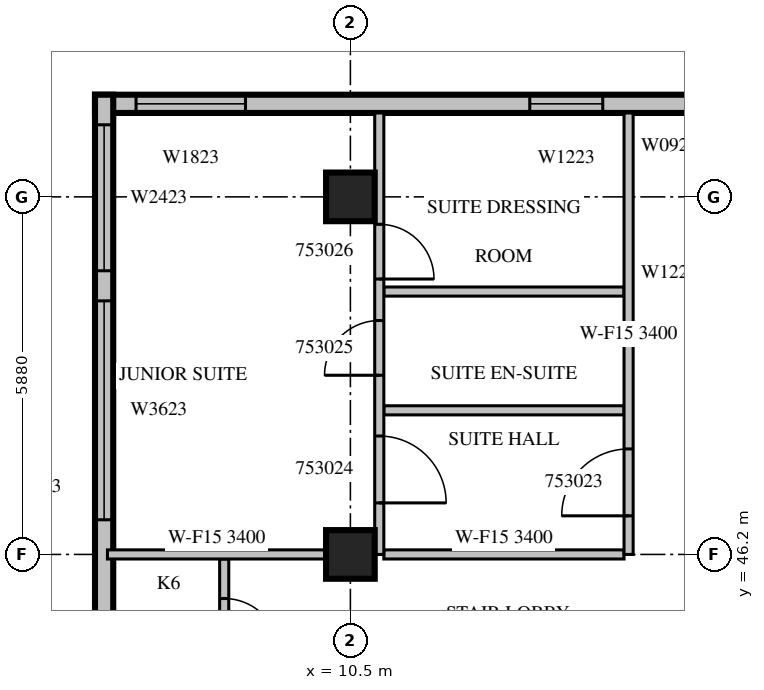
"""IFC4 building model, lengths in metres.
Left out: names, types, materials, properties, quantities, classifications, styles, units other than length and angle.
Written with IfcOpenShell. Run it as: python <this file> out.ifc"""

import sys

from ifc_helpers import new_model, si_unit, direction, frame, frame_2d, origin, origin_2d, place, context, subcontext, project, spatial, rectangle, extrude, source, transform, mapped, element, fill, save


model = new_model("IFC4")
c1 = context("Model", 3, precision=1e-05, world=origin(), true_north=direction((0.0, 1.0)))
c2 = subcontext(c1, "Body", "Model", "MODEL_VIEW")
j1 = project(units=[si_unit("LENGTHUNIT", "METRE"), si_unit("PLANEANGLEUNIT", "RADIAN")], contexts=[c1])
p1 = place(None, origin())
s1 = spatial("IfcSite", under=j1, at=p1, CompositionType="ELEMENT")
p2 = place(p1, origin())
s2 = spatial("IfcBuilding", under=s1, at=p2, CompositionType="ELEMENT")
p3 = place(p2, frame((0.0, 0.0, 234.8)))
s3 = spatial("IfcBuildingStorey", under=s2, at=p3, CompositionType="ELEMENT", Elevation=234.8)
m1 = source(origin(), c2, "Body", "SweptSolid", [
    extrude(rectangle(XDim=0.8, YDim=0.8, at=origin_2d()), origin(), (0.0, 0.0, 1.0), 3.8),
])
for number, where, z_axis, x_axis in (
    (1, (10.5, 46.2, 0.0), (0.0, 0.0, 1.0), (1.0, 0.0, 0.0)),
    (2, (10.5, 52.08, 0.0), (0.0, 0.0, 1.0), (1.0, 0.0, 0.0)),
):
    element("IfcColumn", number, at=place(p3, frame(where, z_axis=z_axis, x_axis=x_axis)), inside=s3, PredefinedType="COLUMN", context=c2, shape_type="MappedRepresentation", body=[
        mapped(m1, transform((0.0, 0.0, 0.0), scale=1.0)),
    ])
m2 = source(origin(), c2, "Body", "SweptSolid", [
    extrude(rectangle(XDim=10.5, YDim=0.3, at=frame_2d((5.25, 0.0))), origin(), (0.0, 0.0, 1.0), 3.4),
])
p4 = place(p3, frame((16.8, 53.61, 0.0), z_axis=(0.0, 0.0, 1.0), x_axis=(-1.0, 0.0, 0.0)))
e3 = element("IfcWall", 3, at=p4, inside=s3, PredefinedType="STANDARD", context=c2, shape_type="MappedRepresentation", body=[
    mapped(m2, transform((0.0, 0.0, 0.0), scale=1.0)),
])
m3 = source(origin(), c2, "Body", "SweptSolid", [
    extrude(rectangle(XDim=1.2, YDim=2.3, at=frame_2d((0.6, 1.15))), frame((0.0, 0.16, 0.0), z_axis=(0.0, -1.0, 0.0), x_axis=(1.0, 0.0, 0.0)), (0.0, 0.0, 1.0), 0.32),
])
p5 = place(p4, frame((2.15, 0.0, 0.6)))
e4 = element("IfcOpeningElement", 4, at=p5, cuts=e3, PredefinedType="OPENING", context=c2, shape_type="MappedRepresentation", body=[
    mapped(m3, transform((0.0, 0.0, 0.0), scale=1.0)),
])
m4 = source(origin(), c2, "Body", "SweptSolid", [
    extrude(rectangle(XDim=1.8, YDim=2.3, at=frame_2d((0.9, 1.15))), frame((0.0, 0.16, 0.0), z_axis=(0.0, -1.0, 0.0), x_axis=(1.0, 0.0, 0.0)), (0.0, 0.0, 1.0), 0.32),
])
p6 = place(p4, frame((8.025, 0.0, 0.6)))
e5 = element("IfcOpeningElement", 5, at=p6, cuts=e3, PredefinedType="OPENING", context=c2, shape_type="MappedRepresentation", body=[
    mapped(m4, transform((0.0, 0.0, 0.0), scale=1.0)),
])
m5 = source(origin(), c2, "Body", "SweptSolid", [
    extrude(rectangle(XDim=9.91, YDim=0.3, at=frame_2d((4.955, 0.0))), origin(), (0.0, 0.0, 1.0), 3.4),
])
p7 = place(p3, frame((6.45, 53.76, 0.0), z_axis=(0.0, 0.0, 1.0), x_axis=(0.0, -1.0, 0.0)))
e6 = element("IfcWall", 6, at=p7, inside=s3, PredefinedType="STANDARD", context=c2, shape_type="MappedRepresentation", body=[
    mapped(m5, transform((0.0, 0.0, 0.0), scale=1.0)),
])
m6 = source(origin(), c2, "Body", "SweptSolid", [
    extrude(rectangle(XDim=3.6, YDim=2.3, at=frame_2d((1.8, 1.15))), frame((0.0, 0.16, 0.0), z_axis=(0.0, -1.0, 0.0), x_axis=(1.0, 0.0, 0.0)), (0.0, 0.0, 1.0), 0.32),
])
p8 = place(p7, frame((3.39, 0.0, 0.6)))
e7 = element("IfcOpeningElement", 7, at=p8, cuts=e6, PredefinedType="OPENING", context=c2, shape_type="MappedRepresentation", body=[
    mapped(m6, transform((0.0, 0.0, 0.0), scale=1.0)),
])
m7 = source(origin(), c2, "Body", "SweptSolid", [
    extrude(rectangle(XDim=2.4, YDim=2.3, at=frame_2d((1.2, 1.15))), frame((0.0, 0.16, 0.0), z_axis=(0.0, -1.0, 0.0), x_axis=(1.0, 0.0, 0.0)), (0.0, 0.0, 1.0), 0.32),
])
p9 = place(p7, frame((0.495, 0.0, 0.6)))
e8 = element("IfcOpeningElement", 8, at=p9, cuts=e6, PredefinedType="OPENING", context=c2, shape_type="MappedRepresentation", body=[
    mapped(m7, transform((0.0, 0.0, 0.0), scale=1.0)),
])
m8 = source(origin(), c2, "Body", "SweptSolid", [
    extrude(rectangle(XDim=2.2, YDim=0.15, at=frame_2d((1.1, 0.0))), origin(), (0.0, 0.0, 1.0), 3.4),
])
p10 = place(p3, frame((8.425, 43.925, 0.0), z_axis=(0.0, 0.0, 1.0), x_axis=(0.0, 1.0, 0.0)))
e9 = element("IfcWall", 9, at=p10, inside=s3, PredefinedType="PARTITIONING", context=c2, shape_type="MappedRepresentation", body=[
    mapped(m8, transform((0.0, 0.0, 0.0), scale=1.0)),
])
m9 = source(origin(), c2, "Body", "SweptSolid", [
    extrude(rectangle(XDim=0.9, YDim=2.1, at=frame_2d((0.45, 1.05))), frame((0.0, 0.085, 0.0), z_axis=(0.0, -1.0, 0.0), x_axis=(1.0, 0.0, 0.0)), (0.0, 0.0, 1.0), 0.17),
])
p11 = place(p10, frame((0.65, 0.0, 0.0)))
e10 = element("IfcOpeningElement", 10, at=p11, cuts=e9, PredefinedType="OPENING", context=c2, shape_type="MappedRepresentation", body=[
    mapped(m9, transform((0.0, 0.0, 0.0), scale=1.0)),
])
m10 = source(origin(), c2, "Body", "SweptSolid", [
    extrude(rectangle(XDim=3.95, YDim=0.15, at=frame_2d((1.975, 0.0))), origin(), (0.0, 0.0, 1.0), 3.4),
])
for number, where, z_axis, x_axis in (
    (11, (15.0, 48.57, 0.0), (0.0, 0.0, 1.0), (-1.0, 0.0, 0.0)),
    (12, (15.0, 50.523, 0.0), (0.0, 0.0, 1.0), (-1.0, 0.0, 0.0)),
):
    element("IfcWall", number, at=place(p3, frame(where, z_axis=z_axis, x_axis=x_axis)), inside=s3, PredefinedType="PARTITIONING", context=c2, shape_type="MappedRepresentation", body=[
        mapped(m10, transform((0.0, 0.0, 0.0), scale=1.0)),
    ])
m11 = source(origin(), c2, "Body", "SweptSolid", [
    extrude(rectangle(XDim=3.596, YDim=0.15, at=frame_2d((1.798, 0.0))), origin(), (0.0, 0.0, 1.0), 3.4),
])
p12 = place(p3, frame((10.101, 46.2, 0.0), z_axis=(0.0, 0.0, 1.0), x_axis=(-1.0, 0.0, 0.0)))
e13 = element("IfcWall", 13, at=p12, inside=s3, PredefinedType="PARTITIONING", context=c2, shape_type="MappedRepresentation", body=[
    mapped(m11, transform((0.0, 0.0, 0.0), scale=1.0)),
])
p13 = place(p3, frame((15.0, 46.2, 0.0), z_axis=(0.0, 0.0, 1.0), x_axis=(-1.0, 0.0, 0.0)))
e14 = element("IfcWall", 14, at=p13, inside=s3, PredefinedType="PARTITIONING", context=c2, shape_type="MappedRepresentation", body=[
    mapped(m10, transform((0.0, 0.0, 0.0), scale=1.0)),
])
m12 = source(origin(), c2, "Body", "SweptSolid", [
    extrude(rectangle(XDim=7.26, YDim=0.15, at=frame_2d((3.63, 0.0))), origin(), (0.0, 0.0, 1.0), 3.4),
])
p14 = place(p3, frame((10.975, 46.2, 0.0), z_axis=(0.0, 0.0, 1.0), x_axis=(0.0, 1.0, 0.0)))
e15 = element("IfcWall", 15, at=p14, inside=s3, PredefinedType="PARTITIONING", context=c2, shape_type="MappedRepresentation", body=[
    mapped(m12, transform((0.0, 0.0, 0.0), scale=1.0)),
])
m13 = source(origin(), c2, "Body", "SweptSolid", [
    extrude(rectangle(XDim=1.1, YDim=2.1, at=frame_2d((0.55, 1.05))), frame((0.0, 0.085, 0.0), z_axis=(0.0, -1.0, 0.0), x_axis=(1.0, 0.0, 0.0)), (0.0, 0.0, 1.0), 0.17),
])
p15 = place(p14, frame((0.847, 0.0, 0.0)))
e16 = element("IfcOpeningElement", 16, at=p15, cuts=e15, PredefinedType="OPENING", context=c2, shape_type="MappedRepresentation", body=[
    mapped(m13, transform((0.0, 0.0, 0.0), scale=1.0)),
])
p16 = place(p14, frame((2.946, 0.0, 0.0)))
e17 = element("IfcOpeningElement", 17, at=p16, cuts=e15, PredefinedType="OPENING", context=c2, shape_type="MappedRepresentation", body=[
    mapped(m9, transform((0.0, 0.0, 0.0), scale=1.0)),
])
p17 = place(p14, frame((4.529, 0.0, 0.0)))
e18 = element("IfcOpeningElement", 18, at=p17, cuts=e15, PredefinedType="OPENING", context=c2, shape_type="MappedRepresentation", body=[
    mapped(m9, transform((0.0, 0.0, 0.0), scale=1.0)),
])
p18 = place(p3, frame((15.075, 46.2, 0.0), z_axis=(0.0, 0.0, 1.0), x_axis=(0.0, 1.0, 0.0)))
e19 = element("IfcWall", 19, at=p18, inside=s3, PredefinedType="PARTITIONING", context=c2, shape_type="MappedRepresentation", body=[
    mapped(m12, transform((0.0, 0.0, 0.0), scale=1.0)),
])
p19 = place(p18, frame((0.635, 0.0, 0.0)))
e20 = element("IfcOpeningElement", 20, at=p19, cuts=e19, PredefinedType="OPENING", context=c2, shape_type="MappedRepresentation", body=[
    mapped(m13, transform((0.0, 0.0, 0.0), scale=1.0)),
])
m14 = source(origin(), c2, "Body", "SweptSolid", [
    extrude(rectangle(XDim=1.2, YDim=2.3, at=frame_2d((0.6, 1.15))), frame((0.0, 0.03, 0.0), z_axis=(0.0, -1.0, 0.0), x_axis=(1.0, 0.0, 0.0)), (0.0, 0.0, 1.0), 0.06),
])
p20 = place(p5, origin())
e21 = element("IfcWindow", 21, at=p20, inside=s3, PartitioningType="SINGLE_PANEL", PredefinedType="WINDOW", context=c2, shape_type="MappedRepresentation", body=[
    mapped(m14, transform((0.0, 0.0, 0.0), scale=1.0)),
])
fill(e4, e21)
m15 = source(origin(), c2, "Body", "SweptSolid", [
    extrude(rectangle(XDim=1.8, YDim=2.3, at=frame_2d((0.9, 1.15))), frame((0.0, 0.03, 0.0), z_axis=(0.0, -1.0, 0.0), x_axis=(1.0, 0.0, 0.0)), (0.0, 0.0, 1.0), 0.06),
])
p21 = place(p6, origin())
e22 = element("IfcWindow", 22, at=p21, inside=s3, PartitioningType="SINGLE_PANEL", PredefinedType="WINDOW", context=c2, shape_type="MappedRepresentation", body=[
    mapped(m15, transform((0.0, 0.0, 0.0), scale=1.0)),
])
fill(e5, e22)
m16 = source(origin(), c2, "Body", "SweptSolid", [
    extrude(rectangle(XDim=3.6, YDim=2.3, at=frame_2d((1.8, 1.15))), frame((0.0, 0.03, 0.0), z_axis=(0.0, -1.0, 0.0), x_axis=(1.0, 0.0, 0.0)), (0.0, 0.0, 1.0), 0.06),
])
p22 = place(p8, origin())
e23 = element("IfcWindow", 23, at=p22, inside=s3, PartitioningType="SINGLE_PANEL", PredefinedType="WINDOW", context=c2, shape_type="MappedRepresentation", body=[
    mapped(m16, transform((0.0, 0.0, 0.0), scale=1.0)),
])
fill(e7, e23)
m17 = source(origin(), c2, "Body", "SweptSolid", [
    extrude(rectangle(XDim=2.4, YDim=2.3, at=frame_2d((1.2, 1.15))), frame((0.0, 0.03, 0.0), z_axis=(0.0, -1.0, 0.0), x_axis=(1.0, 0.0, 0.0)), (0.0, 0.0, 1.0), 0.06),
])
p23 = place(p9, origin())
e24 = element("IfcWindow", 24, at=p23, inside=s3, PartitioningType="SINGLE_PANEL", PredefinedType="WINDOW", context=c2, shape_type="MappedRepresentation", body=[
    mapped(m17, transform((0.0, 0.0, 0.0), scale=1.0)),
])
fill(e8, e24)
m18 = source(origin(), c2, "Body", "SweptSolid", [
    extrude(rectangle(XDim=0.9, YDim=2.1, at=frame_2d((0.45, 1.05))), frame((0.0, 0.025, 0.0), z_axis=(0.0, -1.0, 0.0), x_axis=(1.0, 0.0, 0.0)), (0.0, 0.0, 1.0), 0.05),
])
p24 = place(p11, origin())
e25 = element("IfcDoor", 25, at=p24, inside=s3, OperationType="SINGLE_SWING_RIGHT", PredefinedType="DOOR", context=c2, shape_type="MappedRepresentation", body=[
    mapped(m18, transform((0.0, 0.0, 0.0), scale=1.0)),
])
fill(e10, e25)
m19 = source(origin(), c2, "Body", "SweptSolid", [
    extrude(rectangle(XDim=1.1, YDim=2.1, at=frame_2d((0.55, 1.05))), frame((0.0, 0.025, 0.0), z_axis=(0.0, -1.0, 0.0), x_axis=(1.0, 0.0, 0.0)), (0.0, 0.0, 1.0), 0.05),
])
p25 = place(p19, origin())
e26 = element("IfcDoor", 26, at=p25, inside=s3, OperationType="SINGLE_SWING_LEFT", PredefinedType="DOOR", context=c2, shape_type="MappedRepresentation", body=[
    mapped(m19, transform((0.0, 0.0, 0.0), scale=1.0)),
])
fill(e20, e26)
p26 = place(p15, origin())
e27 = element("IfcDoor", 27, at=p26, inside=s3, OperationType="SINGLE_SWING_RIGHT", PredefinedType="DOOR", context=c2, shape_type="MappedRepresentation", body=[
    mapped(m19, transform((0.0, 0.0, 0.0), scale=1.0)),
])
fill(e16, e27)
p27 = place(p16, origin())
e28 = element("IfcDoor", 28, at=p27, inside=s3, OperationType="SINGLE_SWING_LEFT", PredefinedType="DOOR", context=c2, shape_type="MappedRepresentation", body=[
    mapped(m18, transform((0.0, 0.0, 0.0), scale=1.0)),
])
fill(e17, e28)
p28 = place(p17, origin())
e29 = element("IfcDoor", 29, at=p28, inside=s3, OperationType="SINGLE_SWING_RIGHT", PredefinedType="DOOR", context=c2, shape_type="MappedRepresentation", body=[
    mapped(m18, transform((0.0, 0.0, 0.0), scale=1.0)),
])
fill(e18, e29)
save(model, sys.argv[1])
